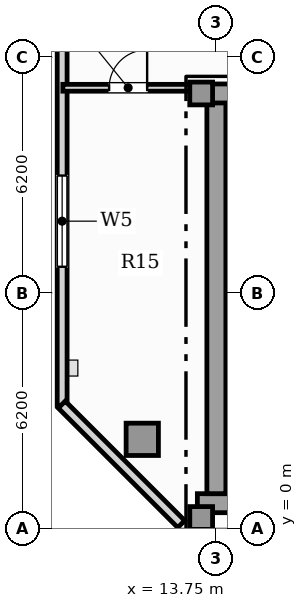
"""IFC4 building model, lengths in metres.
Left out: names, types, materials, properties, quantities, classifications, styles, units other than length and angle.
Written with IfcOpenShell. Run it as: python <this file> out.ifc"""

import sys

from ifc_helpers import new_model, si_unit, direction, frame, frame_2d, origin, origin_2d, place, context, subcontext, project, spatial, rectangle, hollow_rectangle, extrude, element, fill, save


model = new_model("IFC4")
c1 = context("Model", 3, precision=1e-05, world=origin(), true_north=direction((0.0, 1.0)))
c2 = subcontext(c1, "Body", "Model", "MODEL_VIEW")
j1 = project(units=[si_unit("LENGTHUNIT", "METRE"), si_unit("PLANEANGLEUNIT", "RADIAN")], contexts=[c1])
p1 = place(None, origin())
s1 = spatial("IfcSite", under=j1, at=p1, CompositionType="ELEMENT")
p2 = place(p1, origin())
s2 = spatial("IfcBuilding", under=s1, at=p2, CompositionType="ELEMENT")
p3 = place(p2, frame((0.0, 0.0, 349.05)))
s3 = spatial("IfcBuildingStorey", under=s2, at=p3, CompositionType="ELEMENT", Elevation=349.05)
p4 = place(p3, frame((13.25, 0.67, 0.0), z_axis=(0.0, 0.0, 1.0), x_axis=(1.0, 0.0, 0.0)))
e1 = element("IfcWall", 1, at=p4, inside=s3, PredefinedType="SHEAR", context=c2, shape_type="SweptSolid", body=[
    extrude(rectangle(XDim=31.0, YDim=0.5, at=frame_2d((15.5, 0.0))), origin(), (0.0, 0.0, 1.0), 4.14),
])
p5 = place(p3, frame((13.75, 0.92, 0.0), z_axis=(0.0, 0.0, 1.0), x_axis=(0.0, 1.0, 0.0)))
e2 = element("IfcWall", 2, at=p5, inside=s3, PredefinedType="SHEAR", context=c2, shape_type="SweptSolid", body=[
    extrude(rectangle(XDim=10.53, YDim=0.5, at=frame_2d((5.265, 0.0))), origin(), (0.0, 0.0, 1.0), 4.14),
])
p6 = place(p3, frame((13.25, 11.45, 0.0), z_axis=(0.0, 0.0, 1.0), x_axis=(1.0, 0.0, 0.0)))
e3 = element("IfcWall", 3, at=p6, inside=s3, PredefinedType="SHEAR", context=c2, shape_type="SweptSolid", body=[
    extrude(rectangle(XDim=2.95, YDim=0.5, at=frame_2d((1.475, 0.0))), origin(), (0.0, 0.0, 1.0), 4.14),
])
for number, where, z_axis, x_axis in (
    (4, (13.35, 0.28, 0.0), (0.0, 0.0, 1.0), (1.0, 0.0, 0.0)),
    (5, (13.35, 11.45, 0.0), (0.0, 0.0, 1.0), (1.0, 0.0, 0.0)),
):
    element("IfcColumn", number, at=place(p3, frame(where, z_axis=z_axis, x_axis=x_axis)), inside=s3, PredefinedType="COLUMN", context=c2, shape_type="SweptSolid", body=[
        extrude(rectangle(XDim=0.6, YDim=0.6, at=origin_2d()), origin(), (0.0, 0.0, 1.0), 4.4),
    ])
p7 = place(p3, frame((11.8, 2.35, 0.0), z_axis=(0.0, 0.0, 1.0), x_axis=(1.0, 0.0, 0.0)))
e6 = element("IfcColumn", 6, at=p7, inside=s3, PredefinedType="USERDEFINED", context=c2, shape_type="SweptSolid", body=[
    extrude(hollow_rectangle(XDim=0.85, YDim=0.85, WallThickness=0.05, at=origin_2d()), origin(), (0.0, 0.0, 1.0), 4.4),
])
p8 = place(p3, frame((9.692, 27.997, 0.0), z_axis=(0.0, 0.0, 1.0), x_axis=(0.0, -1.0, 0.0)))
e7 = element("IfcWall", 7, at=p8, inside=s3, PredefinedType="SOLIDWALL", context=c2, shape_type="SweptSolid", body=[
    extrude(rectangle(XDim=24.757, YDim=0.26, at=frame_2d((12.378, 0.0))), origin(), (0.0, 0.0, 1.0), 4.14),
])
p9 = place(p8, frame((18.707, 0.0, 0.85)))
e8 = element("IfcOpeningElement", 8, at=p9, cuts=e7, PredefinedType="OPENING", context=c2, shape_type="SweptSolid", body=[
    extrude(rectangle(XDim=2.4, YDim=2.0, at=frame_2d((1.2, 1.0))), frame((0.0, 0.14, 0.0), z_axis=(0.0, -1.0, 0.0), x_axis=(1.0, 0.0, 0.0)), (0.0, 0.0, 1.0), 0.28),
])
p10 = place(p8, frame((10.273, 0.0, 0.9)))
e9 = element("IfcOpeningElement", 9, at=p10, cuts=e7, PredefinedType="OPENING", context=c2, shape_type="SweptSolid", body=[
    extrude(rectangle(XDim=1.5, YDim=1.95, at=frame_2d((0.75, 0.975))), frame((0.0, 0.14, 0.0), z_axis=(0.0, -1.0, 0.0), x_axis=(1.0, 0.0, 0.0)), (0.0, 0.0, 1.0), 0.28),
])
p11 = place(p8, frame((5.8, 0.0, 0.9)))
e10 = element("IfcOpeningElement", 10, at=p11, cuts=e7, PredefinedType="OPENING", context=c2, shape_type="SweptSolid", body=[
    extrude(rectangle(XDim=1.5, YDim=1.95, at=frame_2d((0.75, 0.975))), frame((0.0, 0.14, 0.0), z_axis=(0.0, -1.0, 0.0), x_axis=(1.0, 0.0, 0.0)), (0.0, 0.0, 1.0), 0.28),
])
p12 = place(p3, frame((9.682, 3.264, 0.0), z_axis=(0.0, 0.0, 1.0), x_axis=(0.707079321262, -0.707134240044, 0.0)))
e11 = element("IfcWall", 11, at=p12, inside=s3, PredefinedType="SOLIDWALL", context=c2, shape_type="SweptSolid", body=[
    extrude(rectangle(XDim=4.446, YDim=0.26, at=frame_2d((2.223, 0.0))), origin(), (0.0, 0.0, 1.0), 4.14),
])
p13 = place(p3, frame((14.04, 8.52, 0.0), z_axis=(0.0, 0.0, 1.0), x_axis=(1.0, 0.0, 0.0)))
e12 = element("IfcWall", 12, at=p13, inside=s3, PredefinedType="SOLIDWALL", context=c2, shape_type="SweptSolid", body=[
    extrude(rectangle(XDim=3.4, YDim=0.22, at=frame_2d((1.7, 0.0))), origin(), (0.0, 0.0, 1.0), 4.14),
])
p14 = place(p13, frame((1.125, 0.0, 0.0)))
e13 = element("IfcOpeningElement", 13, at=p14, cuts=e12, PredefinedType="OPENING", context=c2, shape_type="SweptSolid", body=[
    extrude(rectangle(XDim=1.15, YDim=2.2, at=frame_2d((0.575, 1.1))), frame((0.0, 0.12, 0.0), z_axis=(0.0, -1.0, 0.0), x_axis=(1.0, 0.0, 0.0)), (0.0, 0.0, 1.0), 0.24),
])
p15 = place(p3, frame((9.711, 11.6, 0.0), z_axis=(0.0, 0.0, 1.0), x_axis=(1.0, 0.0, 0.0)))
e14 = element("IfcWall", 14, at=p15, inside=s3, PredefinedType="PARTITIONING", context=c2, shape_type="SweptSolid", body=[
    extrude(rectangle(XDim=3.434, YDim=0.18, at=frame_2d((1.717, 0.0))), origin(), (0.0, 0.0, 1.0), 4.14),
])
p16 = place(p15, frame((1.217, 0.0, 0.0)))
e15 = element("IfcOpeningElement", 15, at=p16, cuts=e14, PredefinedType="OPENING", context=c2, shape_type="SweptSolid", body=[
    extrude(rectangle(XDim=1.0, YDim=2.15, at=frame_2d((0.5, 1.075))), frame((0.0, 0.1, 0.0), z_axis=(0.0, -1.0, 0.0), x_axis=(1.0, 0.0, 0.0)), (0.0, 0.0, 1.0), 0.2),
])
p17 = place(p9, origin())
e16 = element("IfcWindow", 16, at=p17, inside=s3, PartitioningType="SINGLE_PANEL", PredefinedType="WINDOW", context=c2, shape_type="SweptSolid", body=[
    extrude(rectangle(XDim=2.4, YDim=2.0, at=frame_2d((1.2, 1.0))), frame((0.0, 0.03, 0.0), z_axis=(0.0, -1.0, 0.0), x_axis=(1.0, 0.0, 0.0)), (0.0, 0.0, 1.0), 0.06),
])
fill(e8, e16)
p18 = place(p16, origin())
e17 = element("IfcDoor", 17, at=p18, inside=s3, OperationType="SINGLE_SWING_RIGHT", PredefinedType="DOOR", context=c2, shape_type="SweptSolid", body=[
    extrude(rectangle(XDim=1.0, YDim=2.15, at=frame_2d((0.5, 1.075))), frame((0.0, 0.025, 0.0), z_axis=(0.0, -1.0, 0.0), x_axis=(1.0, 0.0, 0.0)), (0.0, 0.0, 1.0), 0.05),
])
fill(e15, e17)
save(model, sys.argv[1])
